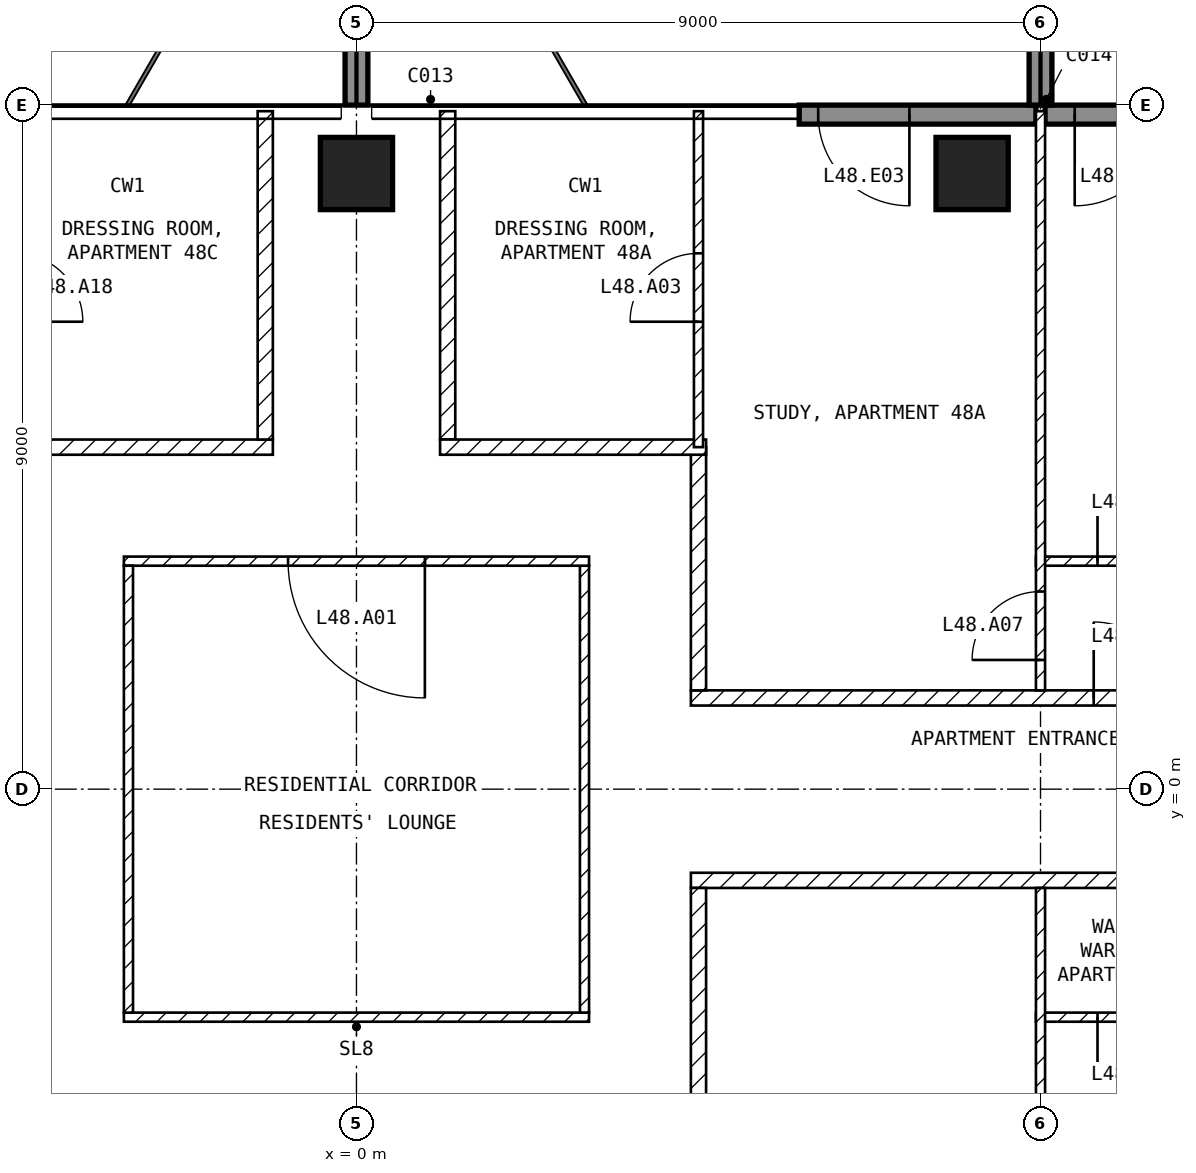
"""IFC4 building model, lengths in metres.
Left out: names, types, materials, properties, quantities, classifications, styles, units other than length and angle.
Written with IfcOpenShell. Run it as: python <this file> out.ifc"""

import sys

from ifc_helpers import new_model, si_unit, direction, frame, frame_2d, origin, origin_2d, place, context, subcontext, project, spatial, rectangle, extrude, element, fill, save


model = new_model("IFC4")
c1 = context("Model", 3, precision=1e-05, world=origin(), true_north=direction((0.0, 1.0)))
c2 = subcontext(c1, "Body", "Model", "MODEL_VIEW")
j1 = project(units=[si_unit("LENGTHUNIT", "METRE"), si_unit("PLANEANGLEUNIT", "RADIAN")], contexts=[c1])
p1 = place(None, origin())
s1 = spatial("IfcSite", under=j1, at=p1, CompositionType="ELEMENT")
p2 = place(p1, origin())
s2 = spatial("IfcBuilding", under=s1, at=p2, CompositionType="ELEMENT")
p3 = place(p2, frame((0.0, 0.0, 194.6)))
s3 = spatial("IfcBuildingStorey", under=s2, at=p3, CompositionType="ELEMENT", Elevation=194.6)
for number, where, z_axis, x_axis in (
    (1, (0.0, 8.1, -0.25), (0.0, 0.0, 1.0), (1.0, 0.0, 0.0)),
    (2, (8.1, 8.1, -0.25), (0.0, 0.0, 1.0), (1.0, 0.0, 0.0)),
):
    element("IfcColumn", number, at=place(p3, frame(where, z_axis=z_axis, x_axis=x_axis)), inside=s3, PredefinedType="COLUMN", context=c2, shape_type="SweptSolid", body=[
        extrude(rectangle(XDim=0.95, YDim=0.95, at=origin_2d()), origin(), (0.0, 0.0, 1.0), 3.5),
    ])
p4 = place(p3, frame((10.9, 8.875, 0.0), z_axis=(0.0, 0.0, 1.0), x_axis=(-1.0, 0.0, 0.0)))
e3 = element("IfcWall", 3, at=p4, inside=s3, PredefinedType="SOLIDWALL", context=c2, shape_type="SweptSolid", body=[
    extrude(rectangle(XDim=1.84, YDim=0.25, at=frame_2d((0.92, 0.0))), origin(), (0.0, 0.0, 1.0), 3.25),
])
p5 = place(p4, frame((0.25, 0.0, 0.0)))
e4 = element("IfcOpeningElement", 4, at=p5, cuts=e3, PredefinedType="OPENING", context=c2, shape_type="SweptSolid", body=[
    extrude(rectangle(XDim=1.2, YDim=2.4, at=frame_2d((0.6, 1.2))), frame((0.0, 0.135, 0.0), z_axis=(0.0, -1.0, 0.0), x_axis=(1.0, 0.0, 0.0)), (0.0, 0.0, 1.0), 0.27),
])
p6 = place(p3, frame((8.94, 8.875, 0.0), z_axis=(0.0, 0.0, 1.0), x_axis=(-1.0, 0.0, 0.0)))
e5 = element("IfcWall", 5, at=p6, inside=s3, PredefinedType="SOLIDWALL", context=c2, shape_type="SweptSolid", body=[
    extrude(rectangle(XDim=3.115, YDim=0.25, at=frame_2d((1.558, 0.0))), origin(), (0.0, 0.0, 1.0), 3.25),
])
p7 = place(p6, frame((1.665, 0.0, 0.0)))
e6 = element("IfcOpeningElement", 6, at=p7, cuts=e5, PredefinedType="OPENING", context=c2, shape_type="SweptSolid", body=[
    extrude(rectangle(XDim=1.2, YDim=2.4, at=frame_2d((0.6, 1.2))), frame((0.0, 0.135, 0.0), z_axis=(0.0, -1.0, 0.0), x_axis=(1.0, 0.0, 0.0)), (0.0, 0.0, 1.0), 0.27),
])
for number, where, z_axis, x_axis in (
    (7, (0.0, 9.0, 0.0), (0.0, 0.0, 1.0), (0.0, 1.0, 0.0)),
    (8, (9.0, 9.0, 0.0), (0.0, 0.0, 1.0), (0.0, 1.0, 0.0)),
):
    element("IfcWall", number, at=place(p3, frame(where, z_axis=z_axis, x_axis=x_axis)), inside=s3, PredefinedType="SOLIDWALL", context=c2, shape_type="SweptSolid", body=[
        extrude(rectangle(XDim=2.7, YDim=0.3, at=frame_2d((1.35, 0.0))), origin(), (0.0, 0.0, 1.0), 3.25),
    ])
p8 = place(p3, frame((-3.06, -3.0, 0.0), z_axis=(0.0, 0.0, 1.0), x_axis=(1.0, 0.0, 0.0)))
e9 = element("IfcWall", 9, at=p8, inside=s3, PredefinedType="PARTITIONING", context=c2, shape_type="SweptSolid", body=[
    extrude(rectangle(XDim=6.12, YDim=0.12, at=frame_2d((3.06, 0.0))), origin(), (0.0, 0.0, 1.0), 3.25),
])
p9 = place(p3, frame((3.0, -2.94, 0.0), z_axis=(0.0, 0.0, 1.0), x_axis=(0.0, 1.0, 0.0)))
e10 = element("IfcWall", 10, at=p9, inside=s3, PredefinedType="PARTITIONING", context=c2, shape_type="SweptSolid", body=[
    extrude(rectangle(XDim=5.88, YDim=0.12, at=frame_2d((2.94, 0.0))), origin(), (0.0, 0.0, 1.0), 3.25),
])
p10 = place(p3, frame((3.06, 3.0, 0.0), z_axis=(0.0, 0.0, 1.0), x_axis=(-1.0, 0.0, 0.0)))
e11 = element("IfcWall", 11, at=p10, inside=s3, PredefinedType="PARTITIONING", context=c2, shape_type="SweptSolid", body=[
    extrude(rectangle(XDim=6.12, YDim=0.12, at=frame_2d((3.06, 0.0))), origin(), (0.0, 0.0, 1.0), 3.25),
])
p11 = place(p10, frame((2.16, 0.0, 0.0)))
e12 = element("IfcOpeningElement", 12, at=p11, cuts=e11, PredefinedType="OPENING", context=c2, shape_type="SweptSolid", body=[
    extrude(rectangle(XDim=1.8, YDim=2.1, at=frame_2d((0.9, 1.05))), frame((0.0, 0.07, 0.0), z_axis=(0.0, -1.0, 0.0), x_axis=(1.0, 0.0, 0.0)), (0.0, 0.0, 1.0), 0.14),
])
p12 = place(p3, frame((-3.0, 2.94, 0.0), z_axis=(0.0, 0.0, 1.0), x_axis=(0.0, -1.0, 0.0)))
e13 = element("IfcWall", 13, at=p12, inside=s3, PredefinedType="PARTITIONING", context=c2, shape_type="SweptSolid", body=[
    extrude(rectangle(XDim=5.88, YDim=0.12, at=frame_2d((2.94, 0.0))), origin(), (0.0, 0.0, 1.0), 3.25),
])
p13 = place(p3, frame((4.4, 1.2, 0.0), z_axis=(0.0, 0.0, 1.0), x_axis=(1.0, 0.0, 0.0)))
e14 = element("IfcWall", 14, at=p13, inside=s3, PredefinedType="PARTITIONING", context=c2, shape_type="SweptSolid", body=[
    extrude(rectangle(XDim=17.2, YDim=0.2, at=frame_2d((8.6, 0.0))), origin(), (0.0, 0.0, 1.0), 3.25),
])
p14 = place(p13, frame((5.3, 0.0, 0.0)))
e15 = element("IfcOpeningElement", 15, at=p14, cuts=e14, PredefinedType="OPENING", context=c2, shape_type="SweptSolid", body=[
    extrude(rectangle(XDim=1.0, YDim=2.1, at=frame_2d((0.5, 1.05))), frame((0.0, 0.11, 0.0), z_axis=(0.0, -1.0, 0.0), x_axis=(1.0, 0.0, 0.0)), (0.0, 0.0, 1.0), 0.22),
])
p15 = place(p3, frame((4.5, 4.5, 0.0), z_axis=(0.0, 0.0, 1.0), x_axis=(0.0, -1.0, 0.0)))
e16 = element("IfcWall", 16, at=p15, inside=s3, PredefinedType="PARTITIONING", context=c2, shape_type="SweptSolid", body=[
    extrude(rectangle(XDim=3.2, YDim=0.2, at=frame_2d((1.6, 0.0))), origin(), (0.0, 0.0, 1.0), 3.25),
])
p16 = place(p3, frame((1.2, 8.92, 0.0), z_axis=(0.0, 0.0, 1.0), x_axis=(0.0, -1.0, 0.0)))
e17 = element("IfcWall", 17, at=p16, inside=s3, PredefinedType="PARTITIONING", context=c2, shape_type="SweptSolid", body=[
    extrude(rectangle(XDim=4.32, YDim=0.2, at=frame_2d((2.16, 0.0))), origin(), (0.0, 0.0, 1.0), 3.25),
])
p17 = place(p3, frame((1.1, 4.5, 0.0), z_axis=(0.0, 0.0, 1.0), x_axis=(1.0, 0.0, 0.0)))
e18 = element("IfcWall", 18, at=p17, inside=s3, PredefinedType="PARTITIONING", context=c2, shape_type="SweptSolid", body=[
    extrude(rectangle(XDim=3.5, YDim=0.2, at=frame_2d((1.75, 0.0))), origin(), (0.0, 0.0, 1.0), 3.25),
])
p18 = place(p3, frame((21.6, -1.2, 0.0), z_axis=(0.0, 0.0, 1.0), x_axis=(-1.0, 0.0, 0.0)))
e19 = element("IfcWall", 19, at=p18, inside=s3, PredefinedType="PARTITIONING", context=c2, shape_type="SweptSolid", body=[
    extrude(rectangle(XDim=17.2, YDim=0.2, at=frame_2d((8.6, 0.0))), origin(), (0.0, 0.0, 1.0), 3.25),
])
p19 = place(p18, frame((6.1, 0.0, 0.0)))
e20 = element("IfcOpeningElement", 20, at=p19, cuts=e19, PredefinedType="OPENING", context=c2, shape_type="SweptSolid", body=[
    extrude(rectangle(XDim=1.0, YDim=2.1, at=frame_2d((0.5, 1.05))), frame((0.0, 0.11, 0.0), z_axis=(0.0, -1.0, 0.0), x_axis=(1.0, 0.0, 0.0)), (0.0, 0.0, 1.0), 0.22),
])
p20 = place(p3, frame((4.5, -1.3, 0.0), z_axis=(0.0, 0.0, 1.0), x_axis=(0.0, -1.0, 0.0)))
e21 = element("IfcWall", 21, at=p20, inside=s3, PredefinedType="PARTITIONING", context=c2, shape_type="SweptSolid", body=[
    extrude(rectangle(XDim=3.2, YDim=0.2, at=frame_2d((1.6, 0.0))), origin(), (0.0, 0.0, 1.0), 3.25),
])
p21 = place(p3, frame((-4.6, 4.5, 0.0), z_axis=(0.0, 0.0, 1.0), x_axis=(1.0, 0.0, 0.0)))
e22 = element("IfcWall", 22, at=p21, inside=s3, PredefinedType="PARTITIONING", context=c2, shape_type="SweptSolid", body=[
    extrude(rectangle(XDim=3.5, YDim=0.2, at=frame_2d((1.75, 0.0))), origin(), (0.0, 0.0, 1.0), 3.25),
])
p22 = place(p3, frame((-1.2, 4.6, 0.0), z_axis=(0.0, 0.0, 1.0), x_axis=(0.0, 1.0, 0.0)))
e23 = element("IfcWall", 23, at=p22, inside=s3, PredefinedType="PARTITIONING", context=c2, shape_type="SweptSolid", body=[
    extrude(rectangle(XDim=4.32, YDim=0.2, at=frame_2d((2.16, 0.0))), origin(), (0.0, 0.0, 1.0), 3.25),
])
p23 = place(p3, frame((8.94, 3.0, 0.0), z_axis=(0.0, 0.0, 1.0), x_axis=(1.0, 0.0, 0.0)))
e24 = element("IfcWall", 24, at=p23, inside=s3, PredefinedType="PARTITIONING", context=c2, shape_type="SweptSolid", body=[
    extrude(rectangle(XDim=5.46, YDim=0.12, at=frame_2d((2.73, 0.0))), origin(), (0.0, 0.0, 1.0), 3.25),
])
p24 = place(p23, frame((0.81, 0.0, 0.0)))
e25 = element("IfcOpeningElement", 25, at=p24, cuts=e24, PredefinedType="OPENING", context=c2, shape_type="SweptSolid", body=[
    extrude(rectangle(XDim=0.9, YDim=2.1, at=frame_2d((0.45, 1.05))), frame((0.0, 0.07, 0.0), z_axis=(0.0, -1.0, 0.0), x_axis=(1.0, 0.0, 0.0)), (0.0, 0.0, 1.0), 0.14),
])
p25 = place(p3, frame((9.0, 1.3, 0.0), z_axis=(0.0, 0.0, 1.0), x_axis=(0.0, 1.0, 0.0)))
e26 = element("IfcWall", 26, at=p25, inside=s3, PredefinedType="PARTITIONING", context=c2, shape_type="SweptSolid", body=[
    extrude(rectangle(XDim=7.62, YDim=0.12, at=frame_2d((3.81, 0.0))), origin(), (0.0, 0.0, 1.0), 3.25),
])
p26 = place(p25, frame((0.4, 0.0, 0.0)))
e27 = element("IfcOpeningElement", 27, at=p26, cuts=e26, PredefinedType="OPENING", context=c2, shape_type="SweptSolid", body=[
    extrude(rectangle(XDim=0.9, YDim=2.1, at=frame_2d((0.45, 1.05))), frame((0.0, 0.07, 0.0), z_axis=(0.0, -1.0, 0.0), x_axis=(1.0, 0.0, 0.0)), (0.0, 0.0, 1.0), 0.14),
])
p27 = place(p3, frame((4.5, 4.5, 0.0), z_axis=(0.0, 0.0, 1.0), x_axis=(0.0, 1.0, 0.0)))
e28 = element("IfcWall", 28, at=p27, inside=s3, PredefinedType="PARTITIONING", context=c2, shape_type="SweptSolid", body=[
    extrude(rectangle(XDim=4.42, YDim=0.12, at=frame_2d((2.21, 0.0))), origin(), (0.0, 0.0, 1.0), 3.25),
])
p28 = place(p27, frame((1.65, 0.0, 0.0)))
e29 = element("IfcOpeningElement", 29, at=p28, cuts=e28, PredefinedType="OPENING", context=c2, shape_type="SweptSolid", body=[
    extrude(rectangle(XDim=0.9, YDim=2.1, at=frame_2d((0.45, 1.05))), frame((0.0, 0.07, 0.0), z_axis=(0.0, -1.0, 0.0), x_axis=(1.0, 0.0, 0.0)), (0.0, 0.0, 1.0), 0.14),
])
p29 = place(p3, frame((11.4, -3.0, 0.0), z_axis=(0.0, 0.0, 1.0), x_axis=(-1.0, 0.0, 0.0)))
e30 = element("IfcWall", 30, at=p29, inside=s3, PredefinedType="PARTITIONING", context=c2, shape_type="SweptSolid", body=[
    extrude(rectangle(XDim=2.46, YDim=0.12, at=frame_2d((1.23, 0.0))), origin(), (0.0, 0.0, 1.0), 3.25),
])
p30 = place(p29, frame((0.75, 0.0, 0.0)))
e31 = element("IfcOpeningElement", 31, at=p30, cuts=e30, PredefinedType="OPENING", context=c2, shape_type="SweptSolid", body=[
    extrude(rectangle(XDim=0.9, YDim=2.1, at=frame_2d((0.45, 1.05))), frame((0.0, 0.07, 0.0), z_axis=(0.0, -1.0, 0.0), x_axis=(1.0, 0.0, 0.0)), (0.0, 0.0, 1.0), 0.14),
])
p31 = place(p3, frame((9.0, -8.92, 0.0), z_axis=(0.0, 0.0, 1.0), x_axis=(0.0, 1.0, 0.0)))
e32 = element("IfcWall", 32, at=p31, inside=s3, PredefinedType="PARTITIONING", context=c2, shape_type="SweptSolid", body=[
    extrude(rectangle(XDim=7.62, YDim=0.12, at=frame_2d((3.81, 0.0))), origin(), (0.0, 0.0, 1.0), 3.25),
])
p32 = place(p31, frame((2.62, 0.0, 0.0)))
e33 = element("IfcOpeningElement", 33, at=p32, cuts=e32, PredefinedType="OPENING", context=c2, shape_type="SweptSolid", body=[
    extrude(rectangle(XDim=0.9, YDim=2.1, at=frame_2d((0.45, 1.05))), frame((0.0, 0.07, 0.0), z_axis=(0.0, -1.0, 0.0), x_axis=(1.0, 0.0, 0.0)), (0.0, 0.0, 1.0), 0.14),
])
p33 = place(p5, origin())
e34 = element("IfcDoor", 34, at=p33, inside=s3, OperationType="SINGLE_SWING_RIGHT", PredefinedType="DOOR", context=c2, shape_type="SweptSolid", body=[
    extrude(rectangle(XDim=1.2, YDim=2.4, at=frame_2d((0.6, 1.2))), frame((0.0, 0.025, 0.0), z_axis=(0.0, -1.0, 0.0), x_axis=(1.0, 0.0, 0.0)), (0.0, 0.0, 1.0), 0.05),
])
fill(e4, e34)
p34 = place(p7, origin())
e35 = element("IfcDoor", 35, at=p34, inside=s3, OperationType="SINGLE_SWING_LEFT", PredefinedType="DOOR", context=c2, shape_type="SweptSolid", body=[
    extrude(rectangle(XDim=1.2, YDim=2.4, at=frame_2d((0.6, 1.2))), frame((0.0, 0.025, 0.0), z_axis=(0.0, -1.0, 0.0), x_axis=(1.0, 0.0, 0.0)), (0.0, 0.0, 1.0), 0.05),
])
fill(e6, e35)
p35 = place(p11, origin())
e36 = element("IfcDoor", 36, at=p35, inside=s3, OperationType="SINGLE_SWING_LEFT", PredefinedType="DOOR", context=c2, shape_type="SweptSolid", body=[
    extrude(rectangle(XDim=1.8, YDim=2.1, at=frame_2d((0.9, 1.05))), frame((0.0, 0.025, 0.0), z_axis=(0.0, -1.0, 0.0), x_axis=(1.0, 0.0, 0.0)), (0.0, 0.0, 1.0), 0.05),
])
fill(e12, e36)
p36 = place(p28, origin())
e37 = element("IfcDoor", 37, at=p36, inside=s3, OperationType="SINGLE_SWING_LEFT", PredefinedType="DOOR", context=c2, shape_type="SweptSolid", body=[
    extrude(rectangle(XDim=0.9, YDim=2.1, at=frame_2d((0.45, 1.05))), frame((0.0, 0.025, 0.0), z_axis=(0.0, -1.0, 0.0), x_axis=(1.0, 0.0, 0.0)), (0.0, 0.0, 1.0), 0.05),
])
fill(e29, e37)
p37 = place(p24, origin())
e38 = element("IfcDoor", 38, at=p37, inside=s3, OperationType="SINGLE_SWING_LEFT", PredefinedType="DOOR", context=c2, shape_type="SweptSolid", body=[
    extrude(rectangle(XDim=0.9, YDim=2.1, at=frame_2d((0.45, 1.05))), frame((0.0, 0.025, 0.0), z_axis=(0.0, -1.0, 0.0), x_axis=(1.0, 0.0, 0.0)), (0.0, 0.0, 1.0), 0.05),
])
fill(e25, e38)
p38 = place(p26, origin())
e39 = element("IfcDoor", 39, at=p38, inside=s3, OperationType="SINGLE_SWING_LEFT", PredefinedType="DOOR", context=c2, shape_type="SweptSolid", body=[
    extrude(rectangle(XDim=0.9, YDim=2.1, at=frame_2d((0.45, 1.05))), frame((0.0, 0.025, 0.0), z_axis=(0.0, -1.0, 0.0), x_axis=(1.0, 0.0, 0.0)), (0.0, 0.0, 1.0), 0.05),
])
fill(e27, e39)
p39 = place(p30, origin())
e40 = element("IfcDoor", 40, at=p39, inside=s3, OperationType="SINGLE_SWING_RIGHT", PredefinedType="DOOR", context=c2, shape_type="SweptSolid", body=[
    extrude(rectangle(XDim=0.9, YDim=2.1, at=frame_2d((0.45, 1.05))), frame((0.0, 0.025, 0.0), z_axis=(0.0, -1.0, 0.0), x_axis=(1.0, 0.0, 0.0)), (0.0, 0.0, 1.0), 0.05),
])
fill(e31, e40)
p40 = place(p14, origin())
e41 = element("IfcDoor", 41, at=p40, inside=s3, OperationType="SINGLE_SWING_LEFT", PredefinedType="DOOR", context=c2, shape_type="SweptSolid", body=[
    extrude(rectangle(XDim=1.0, YDim=2.1, at=frame_2d((0.5, 1.05))), frame((0.0, 0.025, 0.0), z_axis=(0.0, -1.0, 0.0), x_axis=(1.0, 0.0, 0.0)), (0.0, 0.0, 1.0), 0.05),
])
fill(e15, e41)
save(model, sys.argv[1])
